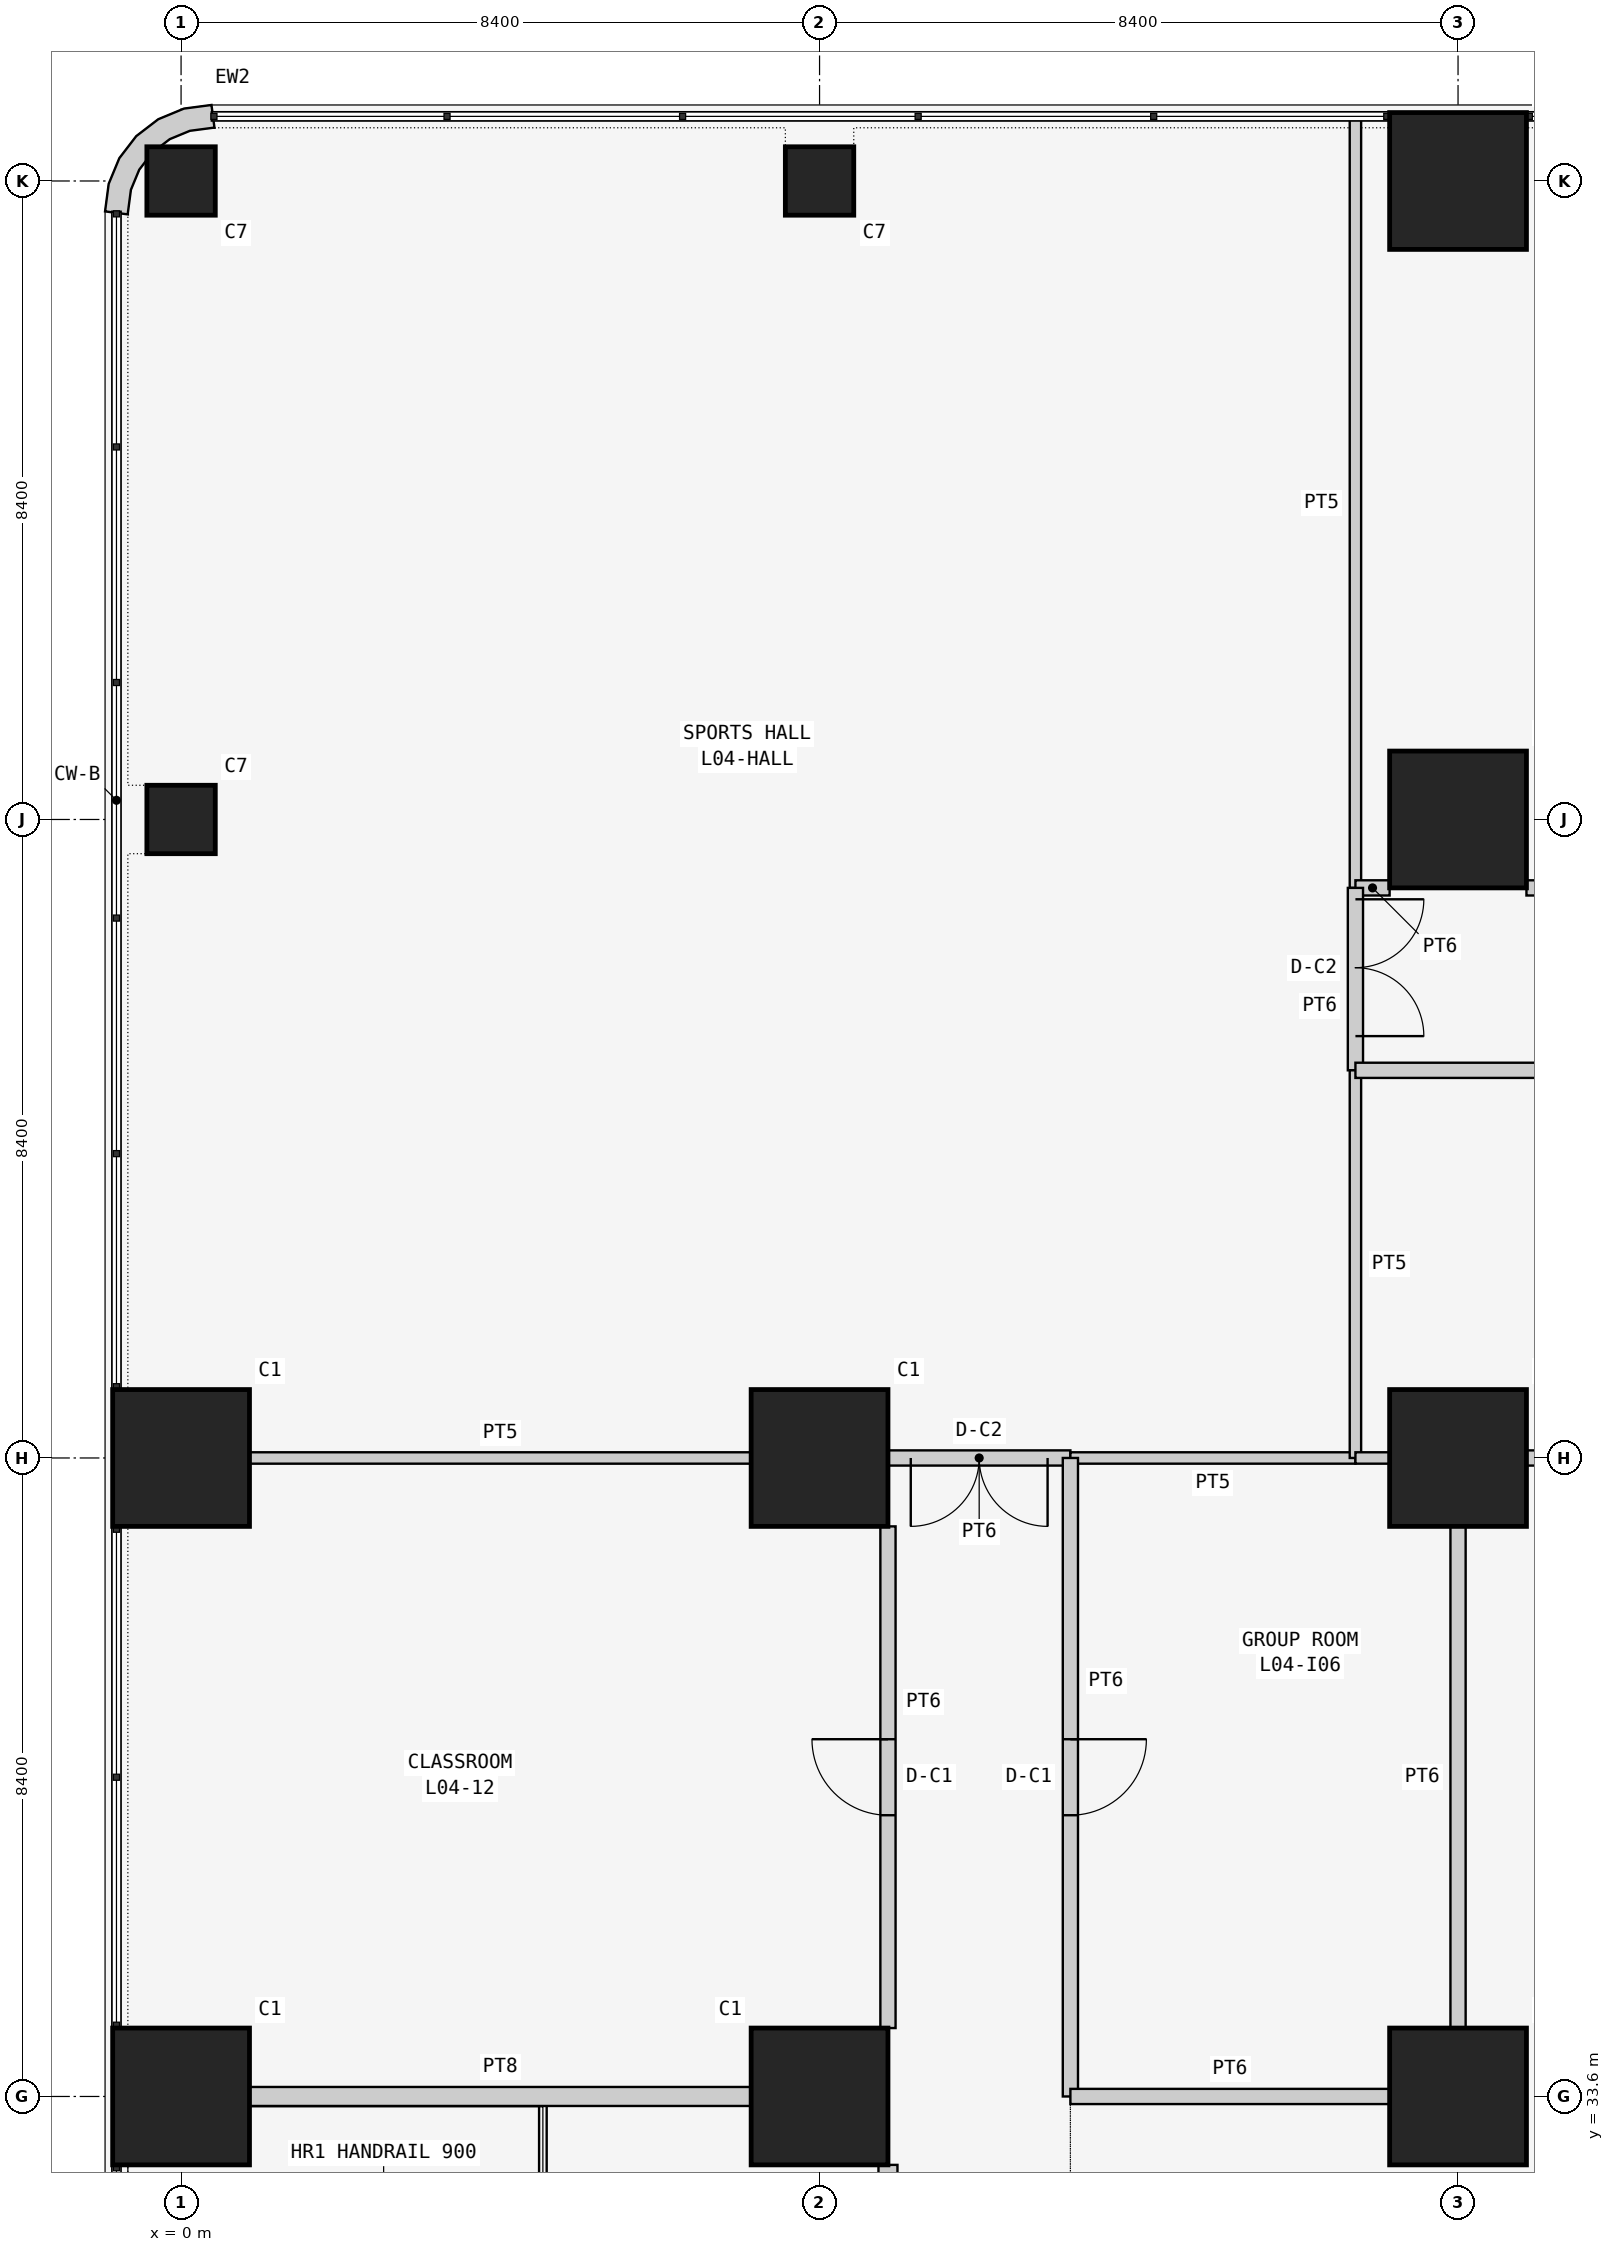
"""IFC4 building model, lengths in metres.
Left out: names, types, materials, properties, quantities, classifications, styles, units other than length and angle.
Written with IfcOpenShell. Run it as: python <this file> out.ifc"""

import sys

from ifc_helpers import new_model, si_unit, direction, frame, frame_2d, origin, origin_2d, place, context, subcontext, project, spatial, polyline, rectangle, outline, extrude, element, fill, save


model = new_model("IFC4")
c1 = context("Model", 3, precision=1e-05, world=origin(), true_north=direction((0.0, 1.0)))
c2 = subcontext(c1, "Body", "Model", "MODEL_VIEW")
j1 = project(units=[si_unit("LENGTHUNIT", "METRE"), si_unit("PLANEANGLEUNIT", "RADIAN")], contexts=[c1])
p1 = place(None, origin())
s1 = spatial("IfcSite", under=j1, at=p1, CompositionType="ELEMENT")
p2 = place(p1, origin())
s2 = spatial("IfcBuilding", under=s1, at=p2, CompositionType="ELEMENT")
p3 = place(p2, frame((0.0, 0.0, 19.5)))
s3 = spatial("IfcBuildingStorey", under=s2, at=p3, CompositionType="ELEMENT", Elevation=19.5)
for number, where, z_axis, x_axis in (
    (1, (0.0, 33.6, 0.0), (0.0, 0.0, 1.0), (1.0, 0.0, 0.0)),
    (2, (0.0, 42.0, 0.0), (0.0, 0.0, 1.0), (1.0, 0.0, 0.0)),
):
    element("IfcColumn", number, at=place(p3, frame(where, z_axis=z_axis, x_axis=x_axis)), inside=s3, PredefinedType="COLUMN", context=c2, shape_type="SweptSolid", body=[
        extrude(rectangle(XDim=1.8, YDim=1.8, at=origin_2d()), origin(), (0.0, 0.0, 1.0), 4.5),
    ])
for number, where, z_axis, x_axis in (
    (3, (0.0, 50.4, 0.0), (0.0, 0.0, 1.0), (1.0, 0.0, 0.0)),
    (4, (0.0, 58.8, 0.0), (0.0, 0.0, 1.0), (1.0, 0.0, 0.0)),
):
    element("IfcColumn", number, at=place(p3, frame(where, z_axis=z_axis, x_axis=x_axis)), inside=s3, PredefinedType="COLUMN", context=c2, shape_type="SweptSolid", body=[
        extrude(rectangle(XDim=0.9, YDim=0.9, at=origin_2d()), origin(), (0.0, 0.0, 1.0), 4.5),
    ])
for number, where, z_axis, x_axis in (
    (5, (8.4, 33.6, 0.0), (0.0, 0.0, 1.0), (1.0, 0.0, 0.0)),
    (6, (8.4, 42.0, 0.0), (0.0, 0.0, 1.0), (1.0, 0.0, 0.0)),
):
    element("IfcColumn", number, at=place(p3, frame(where, z_axis=z_axis, x_axis=x_axis)), inside=s3, PredefinedType="COLUMN", context=c2, shape_type="SweptSolid", body=[
        extrude(rectangle(XDim=1.8, YDim=1.8, at=origin_2d()), origin(), (0.0, 0.0, 1.0), 4.5),
    ])
p4 = place(p3, frame((8.4, 58.8, 0.0), z_axis=(0.0, 0.0, 1.0), x_axis=(1.0, 0.0, 0.0)))
e7 = element("IfcColumn", 7, at=p4, inside=s3, PredefinedType="COLUMN", context=c2, shape_type="SweptSolid", body=[
    extrude(rectangle(XDim=0.9, YDim=0.9, at=origin_2d()), origin(), (0.0, 0.0, 1.0), 4.5),
])
for number, where, z_axis, x_axis in (
    (8, (16.8, 33.6, 0.0), (0.0, 0.0, 1.0), (1.0, 0.0, 0.0)),
    (9, (16.8, 42.0, 0.0), (0.0, 0.0, 1.0), (1.0, 0.0, 0.0)),
    (10, (16.8, 50.4, 0.0), (0.0, 0.0, 1.0), (1.0, 0.0, 0.0)),
    (11, (16.8, 58.8, 0.0), (0.0, 0.0, 1.0), (1.0, 0.0, 0.0)),
):
    element("IfcColumn", number, at=place(p3, frame(where, z_axis=z_axis, x_axis=x_axis)), inside=s3, PredefinedType="COLUMN", context=c2, shape_type="SweptSolid", body=[
        extrude(rectangle(XDim=1.8, YDim=1.8, at=origin_2d()), origin(), (0.0, 0.0, 1.0), 4.5),
    ])
p5 = place(p3, frame((0.445, 59.648, 0.0), z_axis=(0.0, 0.0, 1.0), x_axis=(-0.707106781187, 0.707106781187, 0.0)))
e12 = element("IfcWall", 12, at=p5, inside=s3, PredefinedType="SOLIDWALL", context=c2, shape_type="SweptSolid", body=[
    extrude(outline(polyline([(0.139, 1.904), (-0.101, 1.72), (-0.087, 1.706), (0.1, 1.463), (0.209, 1.198), (0.247, 0.914), (0.209, 0.63), (0.1, 0.365), (-0.087, 0.122), (-0.101, 0.108), (0.139, -0.076), (0.362, 0.214), (0.502, 0.552), (0.549, 0.914), (0.502, 1.276), (0.362, 1.614), (0.139, 1.904)])), origin(), (0.0, 0.0, 1.0), 4.3),
])
p6 = place(p3, frame((0.9, 33.6, 0.0), z_axis=(0.0, 0.0, 1.0), x_axis=(1.0, 0.0, 0.0)))
e13 = element("IfcWall", 13, at=p6, inside=s3, PredefinedType="SOLIDWALL", context=c2, shape_type="SweptSolid", body=[
    extrude(rectangle(XDim=6.6, YDim=0.25, at=frame_2d((3.3, 0.0))), origin(), (0.0, 0.0, 1.0), 3.543),
])
p7 = place(p3, frame((9.3, 32.7, 0.0), z_axis=(0.0, 0.0, 1.0), x_axis=(0.0, -1.0, 0.0)))
e14 = element("IfcWall", 14, at=p7, inside=s3, PredefinedType="SOLIDWALL", context=c2, shape_type="SweptSolid", body=[
    extrude(rectangle(XDim=6.6, YDim=0.25, at=frame_2d((3.3, 0.0))), origin(), (0.0, 0.0, 1.0), 4.3),
])
p8 = place(p7, frame((2.0, 0.0, 0.0)))
e15 = element("IfcOpeningElement", 15, at=p8, cuts=e14, PredefinedType="OPENING", context=c2, shape_type="SweptSolid", body=[
    extrude(rectangle(XDim=2.6, YDim=2.4, at=frame_2d((1.3, 1.2))), frame((0.0, 0.135, 0.0), z_axis=(0.0, -1.0, 0.0), x_axis=(1.0, 0.0, 0.0)), (0.0, 0.0, 1.0), 0.27),
])
p9 = place(p3, frame((0.9, 42.0, 0.0), z_axis=(0.0, 0.0, 1.0), x_axis=(1.0, 0.0, 0.0)))
e16 = element("IfcWall", 16, at=p9, inside=s3, PredefinedType="PARTITIONING", context=c2, shape_type="SweptSolid", body=[
    extrude(rectangle(XDim=6.6, YDim=0.15, at=frame_2d((3.3, 0.0))), origin(), (0.0, 0.0, 1.0), 3.543),
])
p10 = place(p3, frame((9.3, 41.1, 0.0), z_axis=(0.0, 0.0, 1.0), x_axis=(0.0, -1.0, 0.0)))
e17 = element("IfcWall", 17, at=p10, inside=s3, PredefinedType="PARTITIONING", context=c2, shape_type="SweptSolid", body=[
    extrude(rectangle(XDim=6.6, YDim=0.2, at=frame_2d((3.3, 0.0))), origin(), (0.0, 0.0, 1.0), 4.3),
])
p11 = place(p10, frame((2.8, 0.0, 0.0)))
e18 = element("IfcOpeningElement", 18, at=p11, cuts=e17, PredefinedType="OPENING", context=c2, shape_type="SweptSolid", body=[
    extrude(rectangle(XDim=1.0, YDim=2.1, at=frame_2d((0.5, 1.05))), frame((0.0, 0.11, 0.0), z_axis=(0.0, -1.0, 0.0), x_axis=(1.0, 0.0, 0.0)), (0.0, 0.0, 1.0), 0.22),
])
p12 = place(p3, frame((15.45, 49.5, 0.0), z_axis=(0.0, 0.0, 1.0), x_axis=(0.0, 1.0, 0.0)))
e19 = element("IfcWall", 19, at=p12, inside=s3, PredefinedType="PARTITIONING", context=c2, shape_type="SweptSolid", body=[
    extrude(rectangle(XDim=10.126, YDim=0.15, at=frame_2d((5.063, 0.0))), origin(), (0.0, 0.0, 1.0), 4.3),
])
p13 = place(p3, frame((15.9, 49.5, 0.0), z_axis=(0.0, 0.0, 1.0), x_axis=(-1.0, 0.0, 0.0)))
e20 = element("IfcWall", 20, at=p13, inside=s3, PredefinedType="PARTITIONING", context=c2, shape_type="SweptSolid", body=[
    extrude(rectangle(XDim=0.45, YDim=0.2, at=frame_2d((0.225, 0.0))), origin(), (0.0, 0.0, 1.0), 4.3),
])
p14 = place(p3, frame((24.3, 49.5, 0.0), z_axis=(0.0, 0.0, 1.0), x_axis=(-1.0, 0.0, 0.0)))
e21 = element("IfcWall", 21, at=p14, inside=s3, PredefinedType="PARTITIONING", context=c2, shape_type="SweptSolid", body=[
    extrude(rectangle(XDim=6.6, YDim=0.2, at=frame_2d((3.3, 0.0))), origin(), (0.0, 0.0, 1.0), 4.3),
])
p15 = place(p14, frame((2.8, 0.0, 0.0)))
e22 = element("IfcOpeningElement", 22, at=p15, cuts=e21, PredefinedType="OPENING", context=c2, shape_type="SweptSolid", body=[
    extrude(rectangle(XDim=1.0, YDim=2.1, at=frame_2d((0.5, 1.05))), frame((0.0, 0.11, 0.0), z_axis=(0.0, -1.0, 0.0), x_axis=(1.0, 0.0, 0.0)), (0.0, 0.0, 1.0), 0.22),
])
p16 = place(p3, frame((11.7, 42.0, 0.0), z_axis=(0.0, 0.0, 1.0), x_axis=(-1.0, 0.0, 0.0)))
e23 = element("IfcWall", 23, at=p16, inside=s3, PredefinedType="PARTITIONING", context=c2, shape_type="SweptSolid", body=[
    extrude(rectangle(XDim=2.4, YDim=0.2, at=frame_2d((1.2, 0.0))), origin(), (0.0, 0.0, 1.0), 3.543),
])
p17 = place(p16, frame((0.3, 0.0, 0.0)))
e24 = element("IfcOpeningElement", 24, at=p17, cuts=e23, PredefinedType="OPENING", context=c2, shape_type="SweptSolid", body=[
    extrude(rectangle(XDim=1.8, YDim=2.4, at=frame_2d((0.9, 1.2))), frame((0.0, 0.11, 0.0), z_axis=(0.0, -1.0, 0.0), x_axis=(1.0, 0.0, 0.0)), (0.0, 0.0, 1.0), 0.22),
])
p18 = place(p3, frame((15.45, 49.5, 0.0), z_axis=(0.0, 0.0, 1.0), x_axis=(0.0, -1.0, 0.0)))
e25 = element("IfcWall", 25, at=p18, inside=s3, PredefinedType="PARTITIONING", context=c2, shape_type="SweptSolid", body=[
    extrude(rectangle(XDim=2.4, YDim=0.2, at=frame_2d((1.2, 0.0))), origin(), (0.0, 0.0, 1.0), 4.3),
])
p19 = place(p18, frame((0.15, 0.0, 0.0)))
e26 = element("IfcOpeningElement", 26, at=p19, cuts=e25, PredefinedType="OPENING", context=c2, shape_type="SweptSolid", body=[
    extrude(rectangle(XDim=1.8, YDim=2.4, at=frame_2d((0.9, 1.2))), frame((0.0, 0.11, 0.0), z_axis=(0.0, -1.0, 0.0), x_axis=(1.0, 0.0, 0.0)), (0.0, 0.0, 1.0), 0.22),
])
p20 = place(p3, frame((15.45, 42.0, 0.0), z_axis=(0.0, 0.0, 1.0), x_axis=(-1.0, 0.0, 0.0)))
e27 = element("IfcWall", 27, at=p20, inside=s3, PredefinedType="PARTITIONING", context=c2, shape_type="SweptSolid", body=[
    extrude(rectangle(XDim=3.75, YDim=0.15, at=frame_2d((1.875, 0.0))), origin(), (0.0, 0.0, 1.0), 3.543),
])
p21 = place(p3, frame((15.45, 47.1, 0.0), z_axis=(0.0, 0.0, 1.0), x_axis=(0.0, -1.0, 0.0)))
e28 = element("IfcWall", 28, at=p21, inside=s3, PredefinedType="PARTITIONING", context=c2, shape_type="SweptSolid", body=[
    extrude(rectangle(XDim=5.1, YDim=0.15, at=frame_2d((2.55, 0.0))), origin(), (0.0, 0.0, 1.0), 4.3),
])
p22 = place(p3, frame((11.7, 42.0, 0.0), z_axis=(0.0, 0.0, 1.0), x_axis=(0.0, -1.0, 0.0)))
e29 = element("IfcWall", 29, at=p22, inside=s3, PredefinedType="PARTITIONING", context=c2, shape_type="SweptSolid", body=[
    extrude(rectangle(XDim=8.4, YDim=0.2, at=frame_2d((4.2, 0.0))), origin(), (0.0, 0.0, 1.0), 4.3),
])
p23 = place(p22, frame((3.7, 0.0, 0.0)))
e30 = element("IfcOpeningElement", 30, at=p23, cuts=e29, PredefinedType="OPENING", context=c2, shape_type="SweptSolid", body=[
    extrude(rectangle(XDim=1.0, YDim=2.1, at=frame_2d((0.5, 1.05))), frame((0.0, 0.11, 0.0), z_axis=(0.0, -1.0, 0.0), x_axis=(1.0, 0.0, 0.0)), (0.0, 0.0, 1.0), 0.22),
])
p24 = place(p3, frame((25.2, 47.1, 0.0), z_axis=(0.0, 0.0, 1.0), x_axis=(-1.0, 0.0, 0.0)))
e31 = element("IfcWall", 31, at=p24, inside=s3, PredefinedType="PARTITIONING", context=c2, shape_type="SweptSolid", body=[
    extrude(rectangle(XDim=9.75, YDim=0.2, at=frame_2d((4.875, 0.0))), origin(), (0.0, 0.0, 1.0), 4.3),
])
p25 = place(p24, frame((4.375, 0.0, 0.0)))
e32 = element("IfcOpeningElement", 32, at=p25, cuts=e31, PredefinedType="OPENING", context=c2, shape_type="SweptSolid", body=[
    extrude(rectangle(XDim=1.0, YDim=2.1, at=frame_2d((0.5, 1.05))), frame((0.0, 0.11, 0.0), z_axis=(0.0, -1.0, 0.0), x_axis=(1.0, 0.0, 0.0)), (0.0, 0.0, 1.0), 0.22),
])
p26 = place(p3, frame((11.7, 33.6, 0.0), z_axis=(0.0, 0.0, 1.0), x_axis=(1.0, 0.0, 0.0)))
e33 = element("IfcWall", 33, at=p26, inside=s3, PredefinedType="PARTITIONING", context=c2, shape_type="SweptSolid", body=[
    extrude(rectangle(XDim=4.2, YDim=0.2, at=frame_2d((2.1, 0.0))), origin(), (0.0, 0.0, 1.0), 3.543),
])
p27 = place(p3, frame((16.8, 34.5, 0.0), z_axis=(0.0, 0.0, 1.0), x_axis=(0.0, 1.0, 0.0)))
e34 = element("IfcWall", 34, at=p27, inside=s3, PredefinedType="PARTITIONING", context=c2, shape_type="SweptSolid", body=[
    extrude(rectangle(XDim=6.6, YDim=0.2, at=frame_2d((3.3, 0.0))), origin(), (0.0, 0.0, 1.0), 3.543),
])
p28 = place(p3, frame((17.7, 42.0, 0.0), z_axis=(0.0, 0.0, 1.0), x_axis=(1.0, 0.0, 0.0)))
e35 = element("IfcWall", 35, at=p28, inside=s3, PredefinedType="PARTITIONING", context=c2, shape_type="SweptSolid", body=[
    extrude(rectangle(XDim=2.8, YDim=0.2, at=frame_2d((1.4, 0.0))), origin(), (0.0, 0.0, 1.0), 3.543),
])
p29 = place(p3, frame((15.45, 42.0, 0.0), z_axis=(0.0, 0.0, 1.0), x_axis=(1.0, 0.0, 0.0)))
e36 = element("IfcWall", 36, at=p29, inside=s3, PredefinedType="PARTITIONING", context=c2, shape_type="SweptSolid", body=[
    extrude(rectangle(XDim=0.45, YDim=0.15, at=frame_2d((0.225, 0.0))), origin(), (0.0, 0.0, 1.0), 3.543),
])
p30 = place(p11, frame((1.0, 0.0, 0.0), z_axis=(0.0, 0.0, 1.0), x_axis=(-1.0, 0.0, 0.0)))
e37 = element("IfcDoor", 37, at=p30, inside=s3, OperationType="SINGLE_SWING_RIGHT", PredefinedType="DOOR", context=c2, shape_type="SweptSolid", body=[
    extrude(rectangle(XDim=1.0, YDim=2.1, at=frame_2d((0.5, 1.05))), frame((0.0, 0.025, 0.0), z_axis=(0.0, -1.0, 0.0), x_axis=(1.0, 0.0, 0.0)), (0.0, 0.0, 1.0), 0.05),
])
fill(e18, e37)
p31 = place(p17, origin())
e38 = element("IfcDoor", 38, at=p31, inside=s3, OperationType="DOUBLE_DOOR_SINGLE_SWING", PredefinedType="DOOR", context=c2, shape_type="SweptSolid", body=[
    extrude(rectangle(XDim=1.8, YDim=2.4, at=frame_2d((0.9, 1.2))), frame((0.0, 0.025, 0.0), z_axis=(0.0, -1.0, 0.0), x_axis=(1.0, 0.0, 0.0)), (0.0, 0.0, 1.0), 0.05),
])
fill(e24, e38)
p32 = place(p19, origin())
e39 = element("IfcDoor", 39, at=p32, inside=s3, OperationType="DOUBLE_DOOR_SINGLE_SWING", PredefinedType="DOOR", context=c2, shape_type="SweptSolid", body=[
    extrude(rectangle(XDim=1.8, YDim=2.4, at=frame_2d((0.9, 1.2))), frame((0.0, 0.025, 0.0), z_axis=(0.0, -1.0, 0.0), x_axis=(1.0, 0.0, 0.0)), (0.0, 0.0, 1.0), 0.05),
])
fill(e26, e39)
p33 = place(p23, origin())
e40 = element("IfcDoor", 40, at=p33, inside=s3, OperationType="SINGLE_SWING_LEFT", PredefinedType="DOOR", context=c2, shape_type="SweptSolid", body=[
    extrude(rectangle(XDim=1.0, YDim=2.1, at=frame_2d((0.5, 1.05))), frame((0.0, 0.025, 0.0), z_axis=(0.0, -1.0, 0.0), x_axis=(1.0, 0.0, 0.0)), (0.0, 0.0, 1.0), 0.05),
])
fill(e30, e40)
save(model, sys.argv[1])
